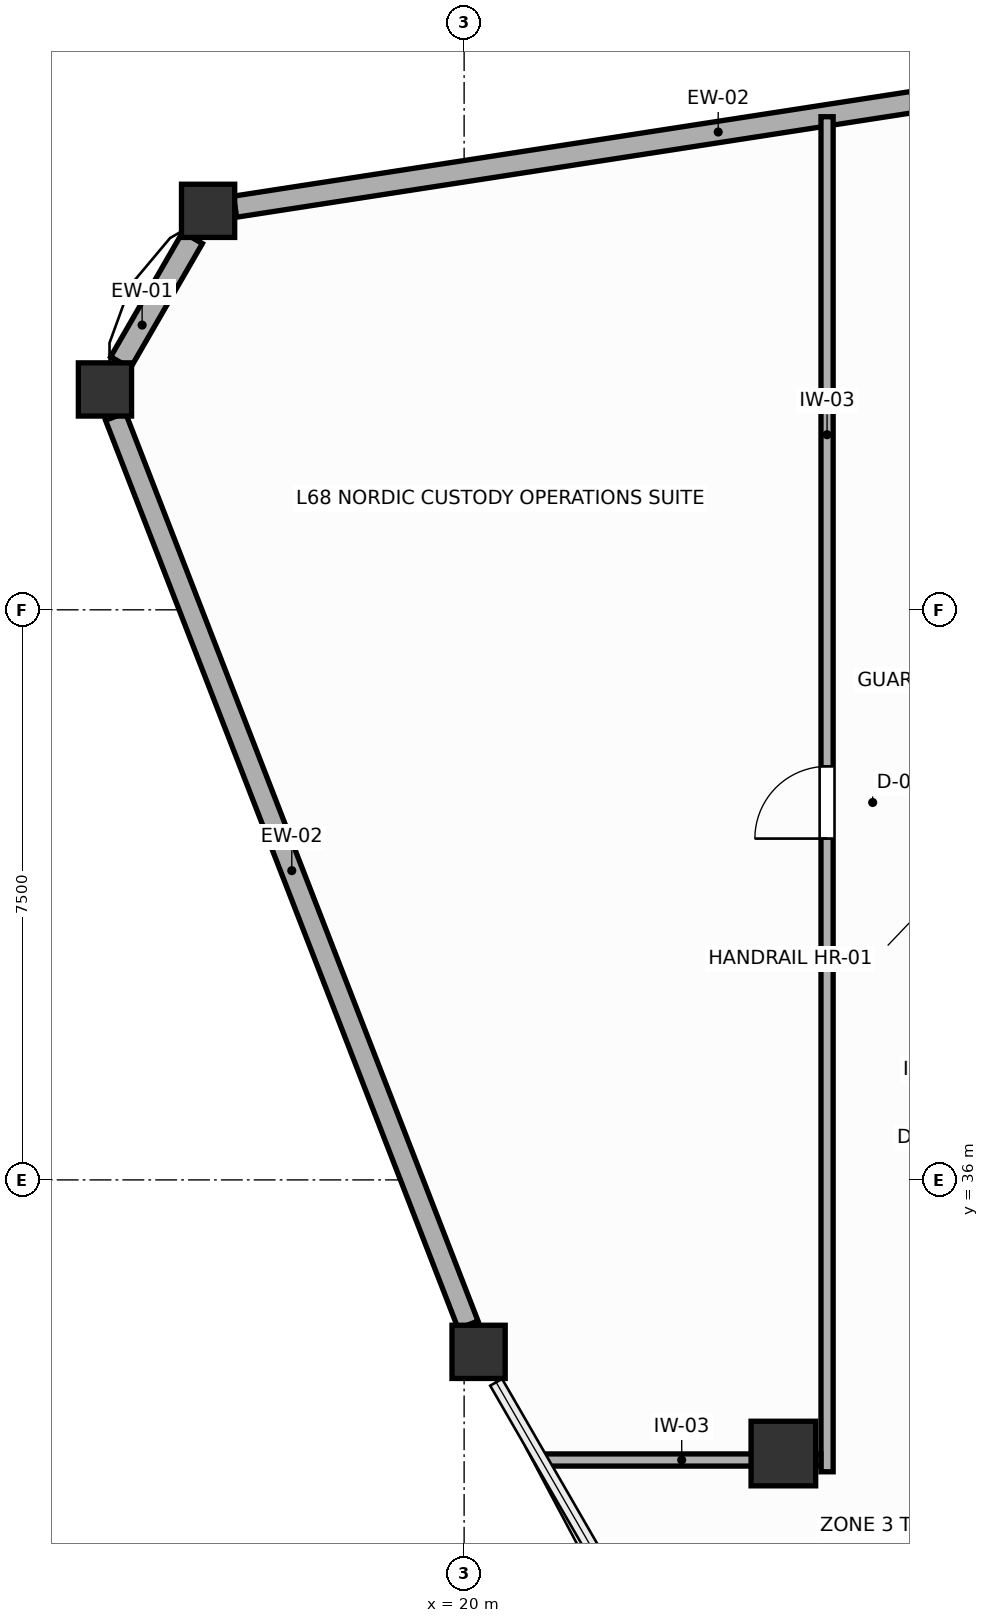
"""IFC4 building model, lengths in metres.
Left out: names, types, materials, properties, quantities, classifications, styles, units other than length and angle.
Written with IfcOpenShell. Run it as: python <this file> out.ifc"""

import sys

from ifc_helpers import new_model, si_unit, direction, frame, frame_2d, origin, origin_2d, place, context, subcontext, project, spatial, rectangle, extrude, source, transform, mapped, element, fill, save


model = new_model("IFC4")
c1 = context("Model", 3, precision=1e-05, world=origin(), true_north=direction((0.0, 1.0)))
c2 = subcontext(c1, "Body", "Model", "MODEL_VIEW")
j1 = project(units=[si_unit("LENGTHUNIT", "METRE"), si_unit("PLANEANGLEUNIT", "RADIAN")], contexts=[c1])
p1 = place(None, origin())
s1 = spatial("IfcSite", under=j1, at=p1, CompositionType="ELEMENT")
p2 = place(p1, origin())
s2 = spatial("IfcBuilding", under=s1, at=p2, CompositionType="ELEMENT")
p3 = place(p2, frame((0.0, 0.0, 261.0)))
s3 = spatial("IfcBuildingStorey", under=s2, at=p3, CompositionType="ELEMENT", Elevation=261.0)
m1 = source(origin(), c2, "Body", "SweptSolid", [
    extrude(rectangle(XDim=0.85, YDim=0.85, at=origin_2d()), origin(), (0.0, 0.0, 1.0), 3.6),
])
p4 = place(p3, frame((24.2, 32.4, 0.0), z_axis=(0.0, 0.0, 1.0), x_axis=(1.0, 0.0, 0.0)))
e1 = element("IfcColumn", 1, at=p4, inside=s3, PredefinedType="COLUMN", context=c2, shape_type="MappedRepresentation", body=[
    mapped(m1, transform((0.0, 0.0, 0.0), scale=1.0)),
])
m2 = source(origin(), c2, "Body", "SweptSolid", [
    extrude(rectangle(XDim=0.7, YDim=0.7, at=origin_2d()), origin(), (0.0, 0.0, 1.0), 3.6),
])
for number, where, z_axis, x_axis in (
    (2, (16.632, 48.749, 0.0), (0.0, 0.0, 1.0), (1.0, 0.0, 0.0)),
    (3, (15.275, 46.399, 0.0), (0.0, 0.0, 1.0), (1.0, 0.0, 0.0)),
    (4, (20.19, 33.738, 0.0), (0.0, 0.0, 1.0), (1.0, 0.0, 0.0)),
):
    element("IfcColumn", number, at=place(p3, frame(where, z_axis=z_axis, x_axis=x_axis)), inside=s3, PredefinedType="COLUMN", context=c2, shape_type="MappedRepresentation", body=[
        mapped(m2, transform((0.0, 0.0, 0.0), scale=1.0)),
    ])
p5 = place(p3, frame((29.699, 50.768, 0.0), z_axis=(0.0, 0.0, 1.0), x_axis=(-0.988274295057, -0.152688957457, 0.0)))
e5 = element("IfcWall", 5, at=p5, inside=s3, PredefinedType="SOLIDWALL", context=c2, shape_type="SweptSolid", body=[
    extrude(rectangle(XDim=12.864, YDim=0.28, at=frame_2d((6.432, 0.0))), origin(), (0.0, 0.0, 1.0), 1.88),
])
p6 = place(p3, frame((16.427, 48.394, 0.0), z_axis=(0.0, 0.0, 1.0), x_axis=(-0.499994028088, -0.866028851642, 0.0)))
e6 = element("IfcWall", 6, at=p6, inside=s3, PredefinedType="SOLIDWALL", context=c2, shape_type="SweptSolid", body=[
    extrude(rectangle(XDim=1.894, YDim=0.3, at=frame_2d((0.947, 0.0))), origin(), (0.0, 0.0, 1.0), 1.88),
])
p7 = place(p3, frame((15.413, 46.044, 0.0), z_axis=(0.0, 0.0, 1.0), x_axis=(0.36191228283, -0.932212153716, 0.0)))
e7 = element("IfcWall", 7, at=p7, inside=s3, PredefinedType="SOLIDWALL", context=c2, shape_type="SweptSolid", body=[
    extrude(rectangle(XDim=12.821, YDim=0.28, at=frame_2d((6.41, 0.0))), origin(), (0.0, 0.0, 1.0), 1.88),
])
p8 = place(p3, frame((24.775, 32.16, 0.0), z_axis=(0.0, 0.0, 1.0), x_axis=(0.0, 1.0, 0.0)))
e8 = element("IfcWall", 8, at=p8, inside=s3, PredefinedType="PARTITIONING", context=c2, shape_type="SweptSolid", body=[
    extrude(rectangle(XDim=17.827, YDim=0.16, at=frame_2d((8.914, 0.0))), origin(), (0.0, 0.0, 1.0), 3.41),
])
p9 = place(p8, frame((8.33, 0.0, 0.0)))
e9 = element("IfcOpeningElement", 9, at=p9, cuts=e8, PredefinedType="OPENING", context=c2, shape_type="SweptSolid", body=[
    extrude(rectangle(XDim=0.95, YDim=2.05, at=frame_2d((0.475, 1.025))), frame((0.0, 0.09, 0.0), z_axis=(0.0, -1.0, 0.0), x_axis=(1.0, 0.0, 0.0)), (0.0, 0.0, 1.0), 0.18),
])
p10 = place(p3, frame((21.032, 32.315, 0.0), z_axis=(0.0, 0.0, 1.0), x_axis=(1.0, 0.0, 0.0)))
e10 = element("IfcWall", 10, at=p10, inside=s3, PredefinedType="PARTITIONING", context=c2, shape_type="SweptSolid", body=[
    extrude(rectangle(XDim=3.661, YDim=0.16, at=frame_2d((1.831, 0.0))), origin(), (0.0, 0.0, 1.0), 2.17),
])
p11 = place(p9, origin())
e11 = element("IfcDoor", 11, at=p11, inside=s3, OperationType="SINGLE_SWING_LEFT", PredefinedType="DOOR", context=c2, shape_type="SweptSolid", body=[
    extrude(rectangle(XDim=0.95, YDim=2.05, at=frame_2d((0.475, 1.025))), frame((0.0, 0.025, 0.0), z_axis=(0.0, -1.0, 0.0), x_axis=(1.0, 0.0, 0.0)), (0.0, 0.0, 1.0), 0.05),
])
fill(e9, e11)
save(model, sys.argv[1])
